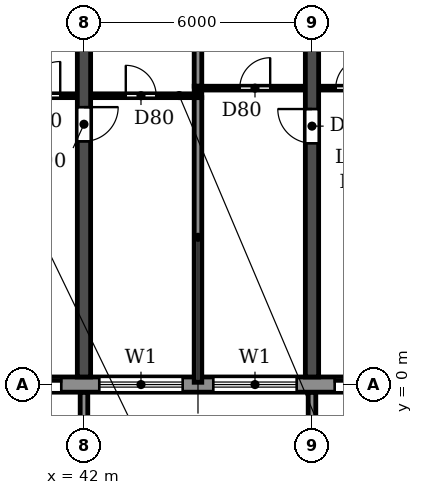
"""IFC4 building model, lengths in metres.
Left out: names, types, materials, properties, quantities, classifications, styles, units other than length and angle.
Written with IfcOpenShell. Run it as: python <this file> out.ifc"""

import sys

from ifc_helpers import new_model, si_unit, direction, frame, frame_2d, origin, place, context, subcontext, project, spatial, polyline, rectangle, outline, extrude, source, transform, mapped, element, fill, save


model = new_model("IFC4")
c1 = context("Model", 3, precision=1e-05, world=origin(), true_north=direction((0.0, 1.0)))
c2 = subcontext(c1, "Body", "Model", "MODEL_VIEW")
j1 = project(units=[si_unit("LENGTHUNIT", "METRE"), si_unit("PLANEANGLEUNIT", "RADIAN")], contexts=[c1])
p1 = place(None, origin())
s1 = spatial("IfcSite", under=j1, at=p1, CompositionType="ELEMENT")
p2 = place(p1, origin())
s2 = spatial("IfcBuilding", under=s1, at=p2, CompositionType="ELEMENT")
p3 = place(p2, frame((0.0, 0.0, 92.7)))
s3 = spatial("IfcBuildingStorey", under=s2, at=p3, CompositionType="ELEMENT", Elevation=92.7)
p4 = place(p3, frame((42.0, 0.2, 0.0), z_axis=(0.0, 0.0, 1.0), x_axis=(0.0, 1.0, 0.0)))
e1 = element("IfcWall", 1, at=p4, inside=s3, PredefinedType="SHEAR", context=c2, shape_type="SweptSolid", body=[
    extrude(rectangle(XDim=11.675, YDim=0.35, at=frame_2d((5.837, 0.0))), origin(), (0.0, 0.0, 1.0), 3.06),
])
p5 = place(p4, frame((6.2, 0.0, 0.0)))
e2 = element("IfcOpeningElement", 2, at=p5, cuts=e1, PredefinedType="OPENING", context=c2, shape_type="SweptSolid", body=[
    extrude(rectangle(XDim=0.9, YDim=2.1, at=frame_2d((0.45, 1.05))), frame((0.0, 0.185, 0.0), z_axis=(0.0, -1.0, 0.0), x_axis=(1.0, 0.0, 0.0)), (0.0, 0.0, 1.0), 0.37),
])
p6 = place(p3, frame((48.0, 0.2, 0.0), z_axis=(0.0, 0.0, 1.0), x_axis=(0.0, 1.0, 0.0)))
e3 = element("IfcWall", 3, at=p6, inside=s3, PredefinedType="SHEAR", context=c2, shape_type="SweptSolid", body=[
    extrude(rectangle(XDim=11.675, YDim=0.35, at=frame_2d((5.837, 0.0))), origin(), (0.0, 0.0, 1.0), 3.06),
])
p7 = place(p6, frame((6.15, 0.0, 0.0)))
e4 = element("IfcOpeningElement", 4, at=p7, cuts=e3, PredefinedType="OPENING", context=c2, shape_type="SweptSolid", body=[
    extrude(rectangle(XDim=0.9, YDim=2.1, at=frame_2d((0.45, 1.05))), frame((0.0, 0.185, 0.0), z_axis=(0.0, -1.0, 0.0), x_axis=(1.0, 0.0, 0.0)), (0.0, 0.0, 1.0), 0.37),
])
p8 = place(p3, frame((10.683, 0.0, 0.0), z_axis=(0.0, 0.0, 1.0), x_axis=(1.0, 0.0, 0.0)))
e5 = element("IfcWall", 5, at=p8, inside=s3, PredefinedType="STANDARD", context=c2, shape_type="SweptSolid", body=[
    extrude(rectangle(XDim=80.634, YDim=0.4, at=frame_2d((40.317, 0.0))), origin(), (0.0, 0.0, 1.0), 3.06),
])
p9 = place(p8, frame((1.717, 0.0, 0.9)))
e6 = element("IfcOpeningElement", 6, at=p9, cuts=e5, PredefinedType="OPENING", context=c2, shape_type="SweptSolid", body=[
    extrude(rectangle(XDim=2.2, YDim=1.5, at=frame_2d((1.1, 0.75))), frame((0.0, 0.21, 0.0), z_axis=(0.0, -1.0, 0.0), x_axis=(1.0, 0.0, 0.0)), (0.0, 0.0, 1.0), 0.42),
])
p10 = place(p8, frame((4.917, 0.0, 0.0)))
e7 = element("IfcOpeningElement", 7, at=p10, cuts=e5, PredefinedType="OPENING", context=c2, shape_type="SweptSolid", body=[
    extrude(rectangle(XDim=1.8, YDim=2.4, at=frame_2d((0.9, 1.2))), frame((0.0, 0.21, 0.0), z_axis=(0.0, -1.0, 0.0), x_axis=(1.0, 0.0, 0.0)), (0.0, 0.0, 1.0), 0.42),
])
p11 = place(p8, frame((7.717, 0.0, 0.9)))
e8 = element("IfcOpeningElement", 8, at=p11, cuts=e5, PredefinedType="OPENING", context=c2, shape_type="SweptSolid", body=[
    extrude(rectangle(XDim=2.2, YDim=1.5, at=frame_2d((1.1, 0.75))), frame((0.0, 0.21, 0.0), z_axis=(0.0, -1.0, 0.0), x_axis=(1.0, 0.0, 0.0)), (0.0, 0.0, 1.0), 0.42),
])
p12 = place(p8, frame((10.717, 0.0, 0.9)))
e9 = element("IfcOpeningElement", 9, at=p12, cuts=e5, PredefinedType="OPENING", context=c2, shape_type="SweptSolid", body=[
    extrude(rectangle(XDim=2.2, YDim=1.5, at=frame_2d((1.1, 0.75))), frame((0.0, 0.21, 0.0), z_axis=(0.0, -1.0, 0.0), x_axis=(1.0, 0.0, 0.0)), (0.0, 0.0, 1.0), 0.42),
])
p13 = place(p8, frame((13.717, 0.0, 0.9)))
e10 = element("IfcOpeningElement", 10, at=p13, cuts=e5, PredefinedType="OPENING", context=c2, shape_type="SweptSolid", body=[
    extrude(rectangle(XDim=2.2, YDim=1.5, at=frame_2d((1.1, 0.75))), frame((0.0, 0.21, 0.0), z_axis=(0.0, -1.0, 0.0), x_axis=(1.0, 0.0, 0.0)), (0.0, 0.0, 1.0), 0.42),
])
p14 = place(p8, frame((16.717, 0.0, 0.9)))
e11 = element("IfcOpeningElement", 11, at=p14, cuts=e5, PredefinedType="OPENING", context=c2, shape_type="SweptSolid", body=[
    extrude(rectangle(XDim=2.2, YDim=1.5, at=frame_2d((1.1, 0.75))), frame((0.0, 0.21, 0.0), z_axis=(0.0, -1.0, 0.0), x_axis=(1.0, 0.0, 0.0)), (0.0, 0.0, 1.0), 0.42),
])
p15 = place(p8, frame((19.717, 0.0, 0.9)))
e12 = element("IfcOpeningElement", 12, at=p15, cuts=e5, PredefinedType="OPENING", context=c2, shape_type="SweptSolid", body=[
    extrude(rectangle(XDim=2.2, YDim=1.5, at=frame_2d((1.1, 0.75))), frame((0.0, 0.21, 0.0), z_axis=(0.0, -1.0, 0.0), x_axis=(1.0, 0.0, 0.0)), (0.0, 0.0, 1.0), 0.42),
])
p16 = place(p8, frame((22.717, 0.0, 0.9)))
e13 = element("IfcOpeningElement", 13, at=p16, cuts=e5, PredefinedType="OPENING", context=c2, shape_type="SweptSolid", body=[
    extrude(rectangle(XDim=2.2, YDim=1.5, at=frame_2d((1.1, 0.75))), frame((0.0, 0.21, 0.0), z_axis=(0.0, -1.0, 0.0), x_axis=(1.0, 0.0, 0.0)), (0.0, 0.0, 1.0), 0.42),
])
p17 = place(p8, frame((25.717, 0.0, 0.9)))
e14 = element("IfcOpeningElement", 14, at=p17, cuts=e5, PredefinedType="OPENING", context=c2, shape_type="SweptSolid", body=[
    extrude(rectangle(XDim=2.2, YDim=1.5, at=frame_2d((1.1, 0.75))), frame((0.0, 0.21, 0.0), z_axis=(0.0, -1.0, 0.0), x_axis=(1.0, 0.0, 0.0)), (0.0, 0.0, 1.0), 0.42),
])
p18 = place(p8, frame((28.917, 0.0, 0.0)))
e15 = element("IfcOpeningElement", 15, at=p18, cuts=e5, PredefinedType="OPENING", context=c2, shape_type="SweptSolid", body=[
    extrude(rectangle(XDim=1.8, YDim=2.4, at=frame_2d((0.9, 1.2))), frame((0.0, 0.21, 0.0), z_axis=(0.0, -1.0, 0.0), x_axis=(1.0, 0.0, 0.0)), (0.0, 0.0, 1.0), 0.42),
])
p19 = place(p8, frame((31.717, 0.0, 0.9)))
e16 = element("IfcOpeningElement", 16, at=p19, cuts=e5, PredefinedType="OPENING", context=c2, shape_type="SweptSolid", body=[
    extrude(rectangle(XDim=2.2, YDim=1.5, at=frame_2d((1.1, 0.75))), frame((0.0, 0.21, 0.0), z_axis=(0.0, -1.0, 0.0), x_axis=(1.0, 0.0, 0.0)), (0.0, 0.0, 1.0), 0.42),
])
p20 = place(p8, frame((34.717, 0.0, 0.9)))
e17 = element("IfcOpeningElement", 17, at=p20, cuts=e5, PredefinedType="OPENING", context=c2, shape_type="SweptSolid", body=[
    extrude(rectangle(XDim=2.2, YDim=1.5, at=frame_2d((1.1, 0.75))), frame((0.0, 0.21, 0.0), z_axis=(0.0, -1.0, 0.0), x_axis=(1.0, 0.0, 0.0)), (0.0, 0.0, 1.0), 0.42),
])
p21 = place(p8, frame((37.917, 0.0, 0.0)))
e18 = element("IfcOpeningElement", 18, at=p21, cuts=e5, PredefinedType="OPENING", context=c2, shape_type="SweptSolid", body=[
    extrude(rectangle(XDim=1.8, YDim=2.4, at=frame_2d((0.9, 1.2))), frame((0.0, 0.21, 0.0), z_axis=(0.0, -1.0, 0.0), x_axis=(1.0, 0.0, 0.0)), (0.0, 0.0, 1.0), 0.42),
])
p22 = place(p8, frame((40.717, 0.0, 0.9)))
e19 = element("IfcOpeningElement", 19, at=p22, cuts=e5, PredefinedType="OPENING", context=c2, shape_type="SweptSolid", body=[
    extrude(rectangle(XDim=2.2, YDim=1.5, at=frame_2d((1.1, 0.75))), frame((0.0, 0.21, 0.0), z_axis=(0.0, -1.0, 0.0), x_axis=(1.0, 0.0, 0.0)), (0.0, 0.0, 1.0), 0.42),
])
p23 = place(p8, frame((43.717, 0.0, 0.9)))
e20 = element("IfcOpeningElement", 20, at=p23, cuts=e5, PredefinedType="OPENING", context=c2, shape_type="SweptSolid", body=[
    extrude(rectangle(XDim=2.2, YDim=1.5, at=frame_2d((1.1, 0.75))), frame((0.0, 0.21, 0.0), z_axis=(0.0, -1.0, 0.0), x_axis=(1.0, 0.0, 0.0)), (0.0, 0.0, 1.0), 0.42),
])
p24 = place(p8, frame((46.717, 0.0, 0.9)))
e21 = element("IfcOpeningElement", 21, at=p24, cuts=e5, PredefinedType="OPENING", context=c2, shape_type="SweptSolid", body=[
    extrude(rectangle(XDim=2.2, YDim=1.5, at=frame_2d((1.1, 0.75))), frame((0.0, 0.21, 0.0), z_axis=(0.0, -1.0, 0.0), x_axis=(1.0, 0.0, 0.0)), (0.0, 0.0, 1.0), 0.42),
])
p25 = place(p8, frame((49.717, 0.0, 0.9)))
e22 = element("IfcOpeningElement", 22, at=p25, cuts=e5, PredefinedType="OPENING", context=c2, shape_type="SweptSolid", body=[
    extrude(rectangle(XDim=2.2, YDim=1.5, at=frame_2d((1.1, 0.75))), frame((0.0, 0.21, 0.0), z_axis=(0.0, -1.0, 0.0), x_axis=(1.0, 0.0, 0.0)), (0.0, 0.0, 1.0), 0.42),
])
p26 = place(p8, frame((52.917, 0.0, 0.0)))
e23 = element("IfcOpeningElement", 23, at=p26, cuts=e5, PredefinedType="OPENING", context=c2, shape_type="SweptSolid", body=[
    extrude(rectangle(XDim=1.8, YDim=2.4, at=frame_2d((0.9, 1.2))), frame((0.0, 0.21, 0.0), z_axis=(0.0, -1.0, 0.0), x_axis=(1.0, 0.0, 0.0)), (0.0, 0.0, 1.0), 0.42),
])
p27 = place(p8, frame((55.717, 0.0, 0.9)))
e24 = element("IfcOpeningElement", 24, at=p27, cuts=e5, PredefinedType="OPENING", context=c2, shape_type="SweptSolid", body=[
    extrude(rectangle(XDim=2.2, YDim=1.5, at=frame_2d((1.1, 0.75))), frame((0.0, 0.21, 0.0), z_axis=(0.0, -1.0, 0.0), x_axis=(1.0, 0.0, 0.0)), (0.0, 0.0, 1.0), 0.42),
])
p28 = place(p8, frame((58.717, 0.0, 0.9)))
e25 = element("IfcOpeningElement", 25, at=p28, cuts=e5, PredefinedType="OPENING", context=c2, shape_type="SweptSolid", body=[
    extrude(rectangle(XDim=2.2, YDim=1.5, at=frame_2d((1.1, 0.75))), frame((0.0, 0.21, 0.0), z_axis=(0.0, -1.0, 0.0), x_axis=(1.0, 0.0, 0.0)), (0.0, 0.0, 1.0), 0.42),
])
p29 = place(p8, frame((61.717, 0.0, 0.9)))
e26 = element("IfcOpeningElement", 26, at=p29, cuts=e5, PredefinedType="OPENING", context=c2, shape_type="SweptSolid", body=[
    extrude(rectangle(XDim=2.2, YDim=1.5, at=frame_2d((1.1, 0.75))), frame((0.0, 0.21, 0.0), z_axis=(0.0, -1.0, 0.0), x_axis=(1.0, 0.0, 0.0)), (0.0, 0.0, 1.0), 0.42),
])
p30 = place(p8, frame((64.917, 0.0, 0.0)))
e27 = element("IfcOpeningElement", 27, at=p30, cuts=e5, PredefinedType="OPENING", context=c2, shape_type="SweptSolid", body=[
    extrude(rectangle(XDim=1.8, YDim=2.4, at=frame_2d((0.9, 1.2))), frame((0.0, 0.21, 0.0), z_axis=(0.0, -1.0, 0.0), x_axis=(1.0, 0.0, 0.0)), (0.0, 0.0, 1.0), 0.42),
])
p31 = place(p8, frame((67.717, 0.0, 0.9)))
e28 = element("IfcOpeningElement", 28, at=p31, cuts=e5, PredefinedType="OPENING", context=c2, shape_type="SweptSolid", body=[
    extrude(rectangle(XDim=2.2, YDim=1.5, at=frame_2d((1.1, 0.75))), frame((0.0, 0.21, 0.0), z_axis=(0.0, -1.0, 0.0), x_axis=(1.0, 0.0, 0.0)), (0.0, 0.0, 1.0), 0.42),
])
p32 = place(p8, frame((70.717, 0.0, 0.9)))
e29 = element("IfcOpeningElement", 29, at=p32, cuts=e5, PredefinedType="OPENING", context=c2, shape_type="SweptSolid", body=[
    extrude(rectangle(XDim=2.2, YDim=1.5, at=frame_2d((1.1, 0.75))), frame((0.0, 0.21, 0.0), z_axis=(0.0, -1.0, 0.0), x_axis=(1.0, 0.0, 0.0)), (0.0, 0.0, 1.0), 0.42),
])
p33 = place(p8, frame((73.917, 0.0, 0.0)))
e30 = element("IfcOpeningElement", 30, at=p33, cuts=e5, PredefinedType="OPENING", context=c2, shape_type="SweptSolid", body=[
    extrude(rectangle(XDim=1.8, YDim=2.4, at=frame_2d((0.9, 1.2))), frame((0.0, 0.21, 0.0), z_axis=(0.0, -1.0, 0.0), x_axis=(1.0, 0.0, 0.0)), (0.0, 0.0, 1.0), 0.42),
])
p34 = place(p8, frame((76.717, 0.0, 0.9)))
e31 = element("IfcOpeningElement", 31, at=p34, cuts=e5, PredefinedType="OPENING", context=c2, shape_type="SweptSolid", body=[
    extrude(rectangle(XDim=2.2, YDim=1.5, at=frame_2d((1.1, 0.75))), frame((0.0, 0.21, 0.0), z_axis=(0.0, -1.0, 0.0), x_axis=(1.0, 0.0, 0.0)), (0.0, 0.0, 1.0), 0.42),
])
m1 = source(origin(), c2, "Body", "SweptSolid", [
    extrude(outline(polyline([(0.0, 0.0), (0.2, 0.0), (0.2, 1.65), (0.0, 1.65), (0.0, 0.0)])), origin(), (0.0, 0.0, 1.0), 3.1),
])
for number, where in (
    (32, (41.9, -1.85, 0.0)),
    (33, (47.9, -1.85, 0.0)),
):
    element("IfcWall", number, at=place(p3, frame(where)), inside=s3, PredefinedType="STANDARD", context=c2, shape_type="MappedRepresentation", body=[
        mapped(m1, transform((0.0, 0.0, 0.0))),
    ])
p35 = place(p3, frame((45.0, 0.06, 0.0), z_axis=(0.0, 0.0, 1.0), x_axis=(0.0, 1.0, 0.0)))
e34 = element("IfcWall", 34, at=p35, inside=s3, PredefinedType="PARTITIONING", context=c2, shape_type="SweptSolid", body=[
    extrude(rectangle(XDim=7.49, YDim=0.2, at=frame_2d((3.745, 0.0))), origin(), (0.0, 0.0, 1.0), 3.06),
])
p36 = place(p3, frame((45.0, 7.85, 0.0), z_axis=(0.0, 0.0, 1.0), x_axis=(0.0, 1.0, 0.0)))
e35 = element("IfcWall", 35, at=p36, inside=s3, PredefinedType="PARTITIONING", context=c2, shape_type="SweptSolid", body=[
    extrude(rectangle(XDim=4.015, YDim=0.2, at=frame_2d((2.007, 0.0))), origin(), (0.0, 0.0, 1.0), 3.06),
])
p37 = place(p3, frame((39.8, 7.6, 0.0), z_axis=(0.0, 0.0, 1.0), x_axis=(1.0, 0.0, 0.0)))
e36 = element("IfcWall", 36, at=p37, inside=s3, PredefinedType="PARTITIONING", context=c2, shape_type="SweptSolid", body=[
    extrude(rectangle(XDim=2.015, YDim=0.1, at=frame_2d((1.007, 0.0))), origin(), (0.0, 0.0, 1.0), 3.06),
])
p38 = place(p37, frame((0.675, 0.0, 0.0)))
e37 = element("IfcOpeningElement", 37, at=p38, cuts=e36, PredefinedType="OPENING", context=c2, shape_type="SweptSolid", body=[
    extrude(rectangle(XDim=0.9, YDim=2.1, at=frame_2d((0.45, 1.05))), frame((0.0, 0.06, 0.0), z_axis=(0.0, -1.0, 0.0), x_axis=(1.0, 0.0, 0.0)), (0.0, 0.0, 1.0), 0.12),
])
p39 = place(p3, frame((42.185, 7.6, 0.0), z_axis=(0.0, 0.0, 1.0), x_axis=(1.0, 0.0, 0.0)))
e38 = element("IfcWall", 38, at=p39, inside=s3, PredefinedType="PARTITIONING", context=c2, shape_type="SweptSolid", body=[
    extrude(rectangle(XDim=2.915, YDim=0.1, at=frame_2d((1.458, 0.0))), origin(), (0.0, 0.0, 1.0), 3.06),
])
p40 = place(p39, frame((0.915, 0.0, 0.0)))
e39 = element("IfcOpeningElement", 39, at=p40, cuts=e38, PredefinedType="OPENING", context=c2, shape_type="SweptSolid", body=[
    extrude(rectangle(XDim=0.8, YDim=2.1, at=frame_2d((0.4, 1.05))), frame((0.0, 0.06, 0.0), z_axis=(0.0, -1.0, 0.0), x_axis=(1.0, 0.0, 0.0)), (0.0, 0.0, 1.0), 0.12),
])
p41 = place(p3, frame((44.9, 7.8, 0.0), z_axis=(0.0, 0.0, 1.0), x_axis=(1.0, 0.0, 0.0)))
e40 = element("IfcWall", 40, at=p41, inside=s3, PredefinedType="PARTITIONING", context=c2, shape_type="SweptSolid", body=[
    extrude(rectangle(XDim=2.915, YDim=0.1, at=frame_2d((1.458, 0.0))), origin(), (0.0, 0.0, 1.0), 3.06),
])
p42 = place(p41, frame((1.2, 0.0, 0.0)))
e41 = element("IfcOpeningElement", 41, at=p42, cuts=e40, PredefinedType="OPENING", context=c2, shape_type="SweptSolid", body=[
    extrude(rectangle(XDim=0.8, YDim=2.1, at=frame_2d((0.4, 1.05))), frame((0.0, 0.06, 0.0), z_axis=(0.0, -1.0, 0.0), x_axis=(1.0, 0.0, 0.0)), (0.0, 0.0, 1.0), 0.12),
])
p43 = place(p3, frame((48.185, 7.8, 0.0), z_axis=(0.0, 0.0, 1.0), x_axis=(1.0, 0.0, 0.0)))
e42 = element("IfcWall", 42, at=p43, inside=s3, PredefinedType="PARTITIONING", context=c2, shape_type="SweptSolid", body=[
    extrude(rectangle(XDim=1.915, YDim=0.1, at=frame_2d((0.958, 0.0))), origin(), (0.0, 0.0, 1.0), 3.06),
])
p44 = place(p43, frame((0.44, 0.0, 0.0)))
e43 = element("IfcOpeningElement", 43, at=p44, cuts=e42, PredefinedType="OPENING", context=c2, shape_type="SweptSolid", body=[
    extrude(rectangle(XDim=0.8, YDim=2.1, at=frame_2d((0.4, 1.05))), frame((0.0, 0.06, 0.0), z_axis=(0.0, -1.0, 0.0), x_axis=(1.0, 0.0, 0.0)), (0.0, 0.0, 1.0), 0.12),
])
p45 = place(p18, origin())
e44 = element("IfcDoor", 44, at=p45, inside=s3, OperationType="DOUBLE_DOOR_SLIDING", PredefinedType="DOOR", context=c2, shape_type="SweptSolid", body=[
    extrude(rectangle(XDim=1.8, YDim=2.4, at=frame_2d((0.9, 1.2))), frame((0.0, 0.025, 0.0), z_axis=(0.0, -1.0, 0.0), x_axis=(1.0, 0.0, 0.0)), (0.0, 0.0, 1.0), 0.05),
])
fill(e15, e44)
p46 = place(p19, origin())
e45 = element("IfcWindow", 45, at=p46, inside=s3, PartitioningType="DOUBLE_PANEL_HORIZONTAL", PredefinedType="WINDOW", context=c2, shape_type="SweptSolid", body=[
    extrude(rectangle(XDim=2.2, YDim=1.5, at=frame_2d((1.1, 0.75))), frame((0.0, 0.03, 0.0), z_axis=(0.0, -1.0, 0.0), x_axis=(1.0, 0.0, 0.0)), (0.0, 0.0, 1.0), 0.06),
])
fill(e16, e45)
p47 = place(p20, origin())
e46 = element("IfcWindow", 46, at=p47, inside=s3, PartitioningType="DOUBLE_PANEL_HORIZONTAL", PredefinedType="WINDOW", context=c2, shape_type="SweptSolid", body=[
    extrude(rectangle(XDim=2.2, YDim=1.5, at=frame_2d((1.1, 0.75))), frame((0.0, 0.03, 0.0), z_axis=(0.0, -1.0, 0.0), x_axis=(1.0, 0.0, 0.0)), (0.0, 0.0, 1.0), 0.06),
])
fill(e17, e46)
p48 = place(p21, origin())
e47 = element("IfcDoor", 47, at=p48, inside=s3, OperationType="DOUBLE_DOOR_SLIDING", PredefinedType="DOOR", context=c2, shape_type="SweptSolid", body=[
    extrude(rectangle(XDim=1.8, YDim=2.4, at=frame_2d((0.9, 1.2))), frame((0.0, 0.025, 0.0), z_axis=(0.0, -1.0, 0.0), x_axis=(1.0, 0.0, 0.0)), (0.0, 0.0, 1.0), 0.05),
])
fill(e18, e47)
p49 = place(p40, origin())
e48 = element("IfcDoor", 48, at=p49, inside=s3, OperationType="SINGLE_SWING_LEFT", PredefinedType="DOOR", context=c2, shape_type="SweptSolid", body=[
    extrude(rectangle(XDim=0.8, YDim=2.1, at=frame_2d((0.4, 1.05))), frame((0.0, 0.025, 0.0), z_axis=(0.0, -1.0, 0.0), x_axis=(1.0, 0.0, 0.0)), (0.0, 0.0, 1.0), 0.05),
])
fill(e39, e48)
p50 = place(p38, origin())
e49 = element("IfcDoor", 49, at=p50, inside=s3, OperationType="SINGLE_SWING_RIGHT", PredefinedType="DOOR", context=c2, shape_type="SweptSolid", body=[
    extrude(rectangle(XDim=0.9, YDim=2.1, at=frame_2d((0.45, 1.05))), frame((0.0, 0.025, 0.0), z_axis=(0.0, -1.0, 0.0), x_axis=(1.0, 0.0, 0.0)), (0.0, 0.0, 1.0), 0.05),
])
fill(e37, e49)
p51 = place(p5, frame((0.9, 0.0, 0.0), z_axis=(0.0, 0.0, 1.0), x_axis=(-1.0, 0.0, 0.0)))
e50 = element("IfcDoor", 50, at=p51, inside=s3, OperationType="SINGLE_SWING_LEFT", PredefinedType="DOOR", context=c2, shape_type="SweptSolid", body=[
    extrude(rectangle(XDim=0.9, YDim=2.1, at=frame_2d((0.45, 1.05))), frame((0.0, 0.025, 0.0), z_axis=(0.0, -1.0, 0.0), x_axis=(1.0, 0.0, 0.0)), (0.0, 0.0, 1.0), 0.05),
])
fill(e2, e50)
p52 = place(p42, origin())
e51 = element("IfcDoor", 51, at=p52, inside=s3, OperationType="SINGLE_SWING_RIGHT", PredefinedType="DOOR", context=c2, shape_type="SweptSolid", body=[
    extrude(rectangle(XDim=0.8, YDim=2.1, at=frame_2d((0.4, 1.05))), frame((0.0, 0.025, 0.0), z_axis=(0.0, -1.0, 0.0), x_axis=(1.0, 0.0, 0.0)), (0.0, 0.0, 1.0), 0.05),
])
fill(e41, e51)
p53 = place(p7, origin())
e52 = element("IfcDoor", 52, at=p53, inside=s3, OperationType="SINGLE_SWING_RIGHT", PredefinedType="DOOR", context=c2, shape_type="SweptSolid", body=[
    extrude(rectangle(XDim=0.9, YDim=2.1, at=frame_2d((0.45, 1.05))), frame((0.0, 0.025, 0.0), z_axis=(0.0, -1.0, 0.0), x_axis=(1.0, 0.0, 0.0)), (0.0, 0.0, 1.0), 0.05),
])
fill(e4, e52)
p54 = place(p44, origin())
e53 = element("IfcDoor", 53, at=p54, inside=s3, OperationType="SINGLE_SWING_RIGHT", PredefinedType="DOOR", context=c2, shape_type="SweptSolid", body=[
    extrude(rectangle(XDim=0.8, YDim=2.1, at=frame_2d((0.4, 1.05))), frame((0.0, 0.025, 0.0), z_axis=(0.0, -1.0, 0.0), x_axis=(1.0, 0.0, 0.0)), (0.0, 0.0, 1.0), 0.05),
])
fill(e43, e53)
save(model, sys.argv[1])
